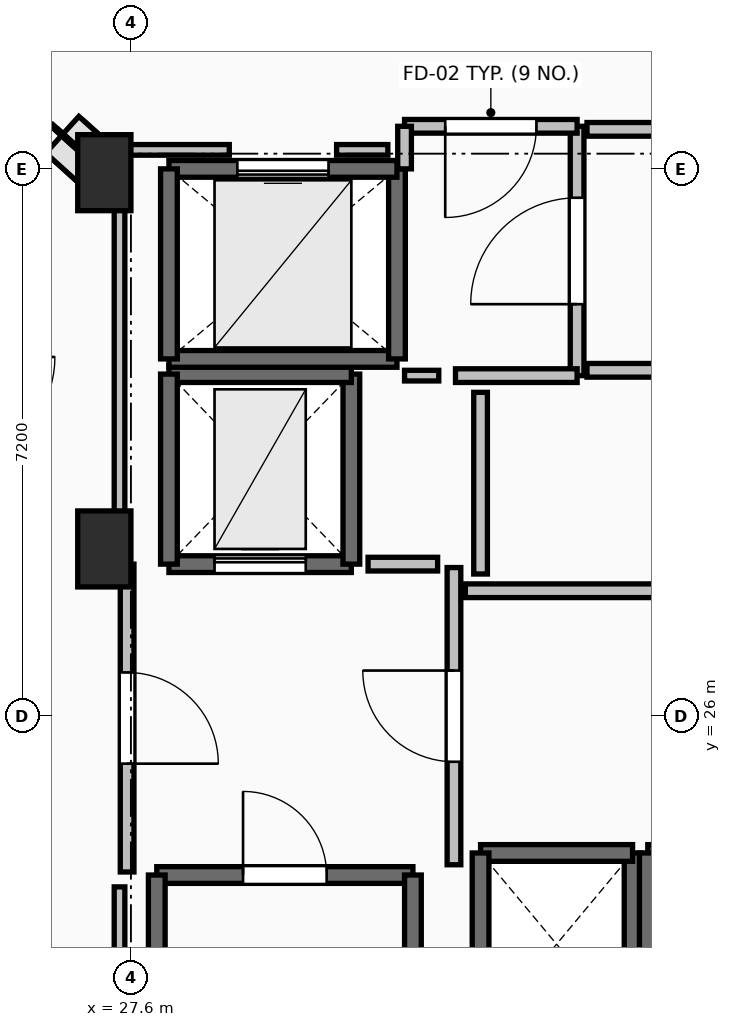
"""IFC4 building model, lengths in metres.
Left out: names, types, materials, properties, quantities, classifications, styles, units other than length and angle.
Written with IfcOpenShell. Run it as: python <this file> out.ifc"""

import sys

from ifc_helpers import new_model, si_unit, direction, frame, frame_2d, origin, origin_2d, place, context, subcontext, project, spatial, rectangle, extrude, element, fill, save


model = new_model("IFC4")
c1 = context("Model", 3, precision=1e-05, world=origin(), true_north=direction((0.0, 1.0)))
c2 = subcontext(c1, "Body", "Model", "MODEL_VIEW")
j1 = project(units=[si_unit("LENGTHUNIT", "METRE"), si_unit("PLANEANGLEUNIT", "RADIAN")], contexts=[c1])
p1 = place(None, origin())
s1 = spatial("IfcSite", under=j1, at=p1, CompositionType="ELEMENT")
p2 = place(p1, origin())
s2 = spatial("IfcBuilding", under=s1, at=p2, CompositionType="ELEMENT")
p3 = place(p2, frame((0.0, 0.0, 224.95)))
s3 = spatial("IfcBuildingStorey", under=s2, at=p3, CompositionType="ELEMENT", Elevation=224.95)
for number, where, z_axis, x_axis in (
    (1, (27.25, 28.2, 0.0), (0.0, 0.0, 1.0), (1.0, 0.0, 0.0)),
    (2, (27.25, 33.15, 0.0), (0.0, 0.0, 1.0), (1.0, 0.0, 0.0)),
):
    element("IfcColumn", number, at=place(p3, frame(where, z_axis=z_axis, x_axis=x_axis)), inside=s3, PredefinedType="PILASTER", context=c2, shape_type="SweptSolid", body=[
        extrude(rectangle(XDim=0.7, YDim=1.0, at=origin_2d()), origin(), (0.0, 0.0, 1.0), 4.8),
    ])
p4 = place(p3, frame((27.94, 23.91, 0.0), z_axis=(0.0, 0.0, 1.0), x_axis=(1.0, 0.0, 0.0)))
e3 = element("IfcWall", 3, at=p4, inside=s3, PredefinedType="SOLIDWALL", context=c2, shape_type="SweptSolid", body=[
    extrude(rectangle(XDim=3.37, YDim=0.22, at=frame_2d((1.685, 0.0))), origin(), (0.0, 0.0, 1.0), 4.5),
])
p5 = place(p4, frame((1.135, 0.0, 0.0)))
e4 = element("IfcOpeningElement", 4, at=p5, cuts=e3, PredefinedType="OPENING", context=c2, shape_type="SweptSolid", body=[
    extrude(rectangle(XDim=1.1, YDim=2.15, at=frame_2d((0.55, 1.075))), frame((0.0, 0.125, 0.0), z_axis=(0.0, -1.0, 0.0), x_axis=(1.0, 0.0, 0.0)), (0.0, 0.0, 1.0), 0.25),
])
for number, where, z_axis, x_axis in (
    (5, (31.31, 23.91, 0.0), (0.0, 0.0, 1.0), (0.0, -1.0, 0.0)),
    (6, (27.94, 16.49, 0.0), (0.0, 0.0, 1.0), (0.0, 1.0, 0.0)),
):
    element("IfcWall", number, at=place(p3, frame(where, z_axis=z_axis, x_axis=x_axis)), inside=s3, PredefinedType="SOLIDWALL", context=c2, shape_type="SweptSolid", body=[
        extrude(rectangle(XDim=7.42, YDim=0.22, at=frame_2d((3.71, 0.0))), origin(), (0.0, 0.0, 1.0), 4.5),
    ])
p6 = place(p3, frame((34.2, 21.8, 0.0), z_axis=(0.0, 0.0, 1.0), x_axis=(0.0, 1.0, 0.0)))
e7 = element("IfcWall", 7, at=p6, inside=s3, PredefinedType="SOLIDWALL", context=c2, shape_type="SweptSolid", body=[
    extrude(rectangle(XDim=2.4, YDim=0.22, at=frame_2d((1.2, 0.0))), origin(), (0.0, 0.0, 1.0), 4.5),
])
p7 = place(p3, frame((34.2, 24.2, 0.0), z_axis=(0.0, 0.0, 1.0), x_axis=(-1.0, 0.0, 0.0)))
e8 = element("IfcWall", 8, at=p7, inside=s3, PredefinedType="SOLIDWALL", context=c2, shape_type="SweptSolid", body=[
    extrude(rectangle(XDim=2.0, YDim=0.22, at=frame_2d((1.0, 0.0))), origin(), (0.0, 0.0, 1.0), 4.5),
])
p8 = place(p3, frame((32.2, 24.2, 0.0), z_axis=(0.0, 0.0, 1.0), x_axis=(0.0, -1.0, 0.0)))
e9 = element("IfcWall", 9, at=p8, inside=s3, PredefinedType="SOLIDWALL", context=c2, shape_type="SweptSolid", body=[
    extrude(rectangle(XDim=2.4, YDim=0.22, at=frame_2d((1.2, 0.0))), origin(), (0.0, 0.0, 1.0), 4.5),
])
p9 = place(p3, frame((36.4, 24.2, 0.0), z_axis=(0.0, 0.0, 1.0), x_axis=(-1.0, 0.0, 0.0)))
e10 = element("IfcWall", 10, at=p9, inside=s3, PredefinedType="SOLIDWALL", context=c2, shape_type="SweptSolid", body=[
    extrude(rectangle(XDim=2.0, YDim=0.22, at=frame_2d((1.0, 0.0))), origin(), (0.0, 0.0, 1.0), 4.5),
])
p10 = place(p3, frame((34.4, 24.2, 0.0), z_axis=(0.0, 0.0, 1.0), x_axis=(0.0, -1.0, 0.0)))
e11 = element("IfcWall", 11, at=p10, inside=s3, PredefinedType="SOLIDWALL", context=c2, shape_type="SweptSolid", body=[
    extrude(rectangle(XDim=2.4, YDim=0.22, at=frame_2d((1.2, 0.0))), origin(), (0.0, 0.0, 1.0), 4.5),
])
p11 = place(p3, frame((28.1, 28.0, 0.0), z_axis=(0.0, 0.0, 1.0), x_axis=(1.0, 0.0, 0.0)))
e12 = element("IfcWall", 12, at=p11, inside=s3, PredefinedType="SHEAR", context=c2, shape_type="SweptSolid", body=[
    extrude(rectangle(XDim=2.4, YDim=0.22, at=frame_2d((1.2, 0.0))), origin(), (0.0, 0.0, 1.0), 4.5),
])
p12 = place(p11, frame((0.6, 0.0, 0.0)))
e13 = element("IfcOpeningElement", 13, at=p12, cuts=e12, PredefinedType="OPENING", context=c2, shape_type="SweptSolid", body=[
    extrude(rectangle(XDim=1.2, YDim=2.2, at=frame_2d((0.6, 1.1))), frame((0.0, 0.125, 0.0), z_axis=(0.0, -1.0, 0.0), x_axis=(1.0, 0.0, 0.0)), (0.0, 0.0, 1.0), 0.25),
])
p13 = place(p3, frame((30.5, 28.0, 0.0), z_axis=(0.0, 0.0, 1.0), x_axis=(0.0, 1.0, 0.0)))
e14 = element("IfcWall", 14, at=p13, inside=s3, PredefinedType="SHEAR", context=c2, shape_type="SweptSolid", body=[
    extrude(rectangle(XDim=2.5, YDim=0.22, at=frame_2d((1.25, 0.0))), origin(), (0.0, 0.0, 1.0), 4.5),
])
p14 = place(p3, frame((30.5, 30.5, 0.0), z_axis=(0.0, 0.0, 1.0), x_axis=(-1.0, 0.0, 0.0)))
e15 = element("IfcWall", 15, at=p14, inside=s3, PredefinedType="SHEAR", context=c2, shape_type="SweptSolid", body=[
    extrude(rectangle(XDim=2.4, YDim=0.22, at=frame_2d((1.2, 0.0))), origin(), (0.0, 0.0, 1.0), 4.5),
])
p15 = place(p3, frame((28.1, 30.5, 0.0), z_axis=(0.0, 0.0, 1.0), x_axis=(0.0, -1.0, 0.0)))
e16 = element("IfcWall", 16, at=p15, inside=s3, PredefinedType="SHEAR", context=c2, shape_type="SweptSolid", body=[
    extrude(rectangle(XDim=2.5, YDim=0.22, at=frame_2d((1.25, 0.0))), origin(), (0.0, 0.0, 1.0), 4.5),
])
p16 = place(p3, frame((28.1, 30.7, 0.0), z_axis=(0.0, 0.0, 1.0), x_axis=(1.0, 0.0, 0.0)))
e17 = element("IfcWall", 17, at=p16, inside=s3, PredefinedType="SOLIDWALL", context=c2, shape_type="SweptSolid", body=[
    extrude(rectangle(XDim=3.0, YDim=0.22, at=frame_2d((1.5, 0.0))), origin(), (0.0, 0.0, 1.0), 4.5),
])
p17 = place(p3, frame((31.1, 30.7, 0.0), z_axis=(0.0, 0.0, 1.0), x_axis=(0.0, 1.0, 0.0)))
e18 = element("IfcWall", 18, at=p17, inside=s3, PredefinedType="SOLIDWALL", context=c2, shape_type="SweptSolid", body=[
    extrude(rectangle(XDim=2.5, YDim=0.22, at=frame_2d((1.25, 0.0))), origin(), (0.0, 0.0, 1.0), 4.5),
])
p18 = place(p3, frame((31.1, 33.2, 0.0), z_axis=(0.0, 0.0, 1.0), x_axis=(-1.0, 0.0, 0.0)))
e19 = element("IfcWall", 19, at=p18, inside=s3, PredefinedType="SOLIDWALL", context=c2, shape_type="SweptSolid", body=[
    extrude(rectangle(XDim=3.0, YDim=0.22, at=frame_2d((1.5, 0.0))), origin(), (0.0, 0.0, 1.0), 4.5),
])
p19 = place(p18, frame((0.9, 0.0, 0.0)))
e20 = element("IfcOpeningElement", 20, at=p19, cuts=e19, PredefinedType="OPENING", context=c2, shape_type="SweptSolid", body=[
    extrude(rectangle(XDim=1.2, YDim=2.2, at=frame_2d((0.6, 1.1))), frame((0.0, 0.125, 0.0), z_axis=(0.0, -1.0, 0.0), x_axis=(1.0, 0.0, 0.0)), (0.0, 0.0, 1.0), 0.25),
])
p20 = place(p3, frame((28.1, 33.2, 0.0), z_axis=(0.0, 0.0, 1.0), x_axis=(0.0, -1.0, 0.0)))
e21 = element("IfcWall", 21, at=p20, inside=s3, PredefinedType="SOLIDWALL", context=c2, shape_type="SweptSolid", body=[
    extrude(rectangle(XDim=2.5, YDim=0.22, at=frame_2d((1.25, 0.0))), origin(), (0.0, 0.0, 1.0), 4.5),
])
p21 = place(p3, frame((31.85, 24.045, 0.0), z_axis=(0.0, 0.0, 1.0), x_axis=(0.0, 1.0, 0.0)))
e22 = element("IfcWall", 22, at=p21, inside=s3, PredefinedType="PARTITIONING", context=c2, shape_type="SweptSolid", body=[
    extrude(rectangle(XDim=3.91, YDim=0.18, at=frame_2d((1.955, 0.0))), origin(), (0.0, 0.0, 1.0), 4.5),
])
p22 = place(p21, frame((1.355, 0.0, 0.0)))
e23 = element("IfcOpeningElement", 23, at=p22, cuts=e22, PredefinedType="OPENING", context=c2, shape_type="SweptSolid", body=[
    extrude(rectangle(XDim=1.2, YDim=2.15, at=frame_2d((0.6, 1.075))), frame((0.0, 0.105, 0.0), z_axis=(0.0, -1.0, 0.0), x_axis=(1.0, 0.0, 0.0)), (0.0, 0.0, 1.0), 0.21),
])
p23 = place(p3, frame((27.55, 28.0, 0.0), z_axis=(0.0, 0.0, 1.0), x_axis=(0.0, -1.0, 0.0)))
e24 = element("IfcWall", 24, at=p23, inside=s3, PredefinedType="PARTITIONING", context=c2, shape_type="SweptSolid", body=[
    extrude(rectangle(XDim=4.05, YDim=0.18, at=frame_2d((2.025, 0.0))), origin(), (0.0, 0.0, 1.0), 3.482),
])
p24 = place(p23, frame((1.425, 0.0, 0.0)))
e25 = element("IfcOpeningElement", 25, at=p24, cuts=e24, PredefinedType="OPENING", context=c2, shape_type="SweptSolid", body=[
    extrude(rectangle(XDim=1.2, YDim=2.15, at=frame_2d((0.6, 1.075))), frame((0.0, 0.105, 0.0), z_axis=(0.0, -1.0, 0.0), x_axis=(1.0, 0.0, 0.0)), (0.0, 0.0, 1.0), 0.21),
])
p25 = place(p3, frame((33.47, 30.48, 0.0), z_axis=(0.0, 0.0, 1.0), x_axis=(0.0, 1.0, 0.0)))
e26 = element("IfcWall", 26, at=p25, inside=s3, PredefinedType="PARTITIONING", context=c2, shape_type="SweptSolid", body=[
    extrude(rectangle(XDim=3.28, YDim=0.18, at=frame_2d((1.64, 0.0))), origin(), (0.0, 0.0, 1.0), 4.5),
])
p26 = place(p25, frame((0.94, 0.0, 0.0)))
e27 = element("IfcOpeningElement", 27, at=p26, cuts=e26, PredefinedType="OPENING", context=c2, shape_type="SweptSolid", body=[
    extrude(rectangle(XDim=1.4, YDim=2.2, at=frame_2d((0.7, 1.1))), frame((0.0, 0.105, 0.0), z_axis=(0.0, -1.0, 0.0), x_axis=(1.0, 0.0, 0.0)), (0.0, 0.0, 1.0), 0.21),
])
p27 = place(p3, frame((31.87, 30.48, 0.0), z_axis=(0.0, 0.0, 1.0), x_axis=(1.0, 0.0, 0.0)))
e28 = element("IfcWall", 28, at=p27, inside=s3, PredefinedType="PARTITIONING", context=c2, shape_type="SweptSolid", body=[
    extrude(rectangle(XDim=1.6, YDim=0.18, at=frame_2d((0.8, 0.0))), origin(), (0.0, 0.0, 1.0), 4.5),
])
p28 = place(p3, frame((33.47, 33.76, 0.0), z_axis=(0.0, 0.0, 1.0), x_axis=(-1.0, 0.0, 0.0)))
e29 = element("IfcWall", 29, at=p28, inside=s3, PredefinedType="PARTITIONING", context=c2, shape_type="SweptSolid", body=[
    extrude(rectangle(XDim=2.27, YDim=0.18, at=frame_2d((1.135, 0.0))), origin(), (0.0, 0.0, 1.0), 4.5),
])
p29 = place(p28, frame((0.535, 0.0, 0.0)))
e30 = element("IfcOpeningElement", 30, at=p29, cuts=e29, PredefinedType="OPENING", context=c2, shape_type="SweptSolid", body=[
    extrude(rectangle(XDim=1.2, YDim=2.15, at=frame_2d((0.6, 1.075))), frame((0.0, 0.105, 0.0), z_axis=(0.0, -1.0, 0.0), x_axis=(1.0, 0.0, 0.0)), (0.0, 0.0, 1.0), 0.21),
])
p30 = place(p3, frame((31.2, 33.76, 0.0), z_axis=(0.0, 0.0, 1.0), x_axis=(0.0, -1.0, 0.0)))
e31 = element("IfcWall", 31, at=p30, inside=s3, PredefinedType="PARTITIONING", context=c2, shape_type="SweptSolid", body=[
    extrude(rectangle(XDim=0.56, YDim=0.18, at=frame_2d((0.28, 0.0))), origin(), (0.0, 0.0, 1.0), 4.5),
])
p31 = place(p3, frame((39.19, 27.65, 0.0), z_axis=(0.0, 0.0, 1.0), x_axis=(-1.0, 0.0, 0.0)))
e32 = element("IfcWall", 32, at=p31, inside=s3, PredefinedType="PARTITIONING", context=c2, shape_type="SweptSolid", body=[
    extrude(rectangle(XDim=7.19, YDim=0.18, at=frame_2d((3.595, 0.0))), origin(), (0.0, 0.0, 1.0), 4.5),
])
p32 = place(p31, frame((2.895, 0.0, 0.0)))
e33 = element("IfcOpeningElement", 33, at=p32, cuts=e32, PredefinedType="OPENING", context=c2, shape_type="SweptSolid", body=[
    extrude(rectangle(XDim=1.4, YDim=2.2, at=frame_2d((0.7, 1.1))), frame((0.0, 0.105, 0.0), z_axis=(0.0, -1.0, 0.0), x_axis=(1.0, 0.0, 0.0)), (0.0, 0.0, 1.0), 0.21),
])
p33 = place(p3, frame((33.6, 30.55, 0.0), z_axis=(0.0, 0.0, 1.0), x_axis=(1.0, 0.0, 0.0)))
e34 = element("IfcWall", 34, at=p33, inside=s3, PredefinedType="PARTITIONING", context=c2, shape_type="SweptSolid", body=[
    extrude(rectangle(XDim=5.2, YDim=0.18, at=frame_2d((2.6, 0.0))), origin(), (0.0, 0.0, 1.0), 3.482),
])
p34 = place(p3, frame((38.8, 33.72, 0.0), z_axis=(0.0, 0.0, 1.0), x_axis=(-1.0, 0.0, 0.0)))
e35 = element("IfcWall", 35, at=p34, inside=s3, PredefinedType="PARTITIONING", context=c2, shape_type="SweptSolid", body=[
    extrude(rectangle(XDim=5.2, YDim=0.18, at=frame_2d((2.6, 0.0))), origin(), (0.0, 0.0, 1.0), 4.5),
])
p35 = place(p34, frame((1.9, 0.0, 0.0)))
e36 = element("IfcOpeningElement", 36, at=p35, cuts=e35, PredefinedType="OPENING", context=c2, shape_type="SweptSolid", body=[
    extrude(rectangle(XDim=1.4, YDim=2.2, at=frame_2d((0.7, 1.1))), frame((0.0, 0.105, 0.0), z_axis=(0.0, -1.0, 0.0), x_axis=(1.0, 0.0, 0.0)), (0.0, 0.0, 1.0), 0.21),
])
p36 = place(p3, frame((31.635, 28.0, 0.0), z_axis=(0.0, 0.0, 1.0), x_axis=(-1.0, 0.0, 0.0)))
e37 = element("IfcWall", 37, at=p36, inside=s3, PredefinedType="PARTITIONING", context=c2, shape_type="SweptSolid", body=[
    extrude(rectangle(XDim=0.915, YDim=0.18, at=frame_2d((0.458, 0.0))), origin(), (0.0, 0.0, 1.0), 4.5),
])
p37 = place(p3, frame((31.2, 30.48, 0.0), z_axis=(0.0, 0.0, 1.0), x_axis=(1.0, 0.0, 0.0)))
e38 = element("IfcWall", 38, at=p37, inside=s3, PredefinedType="PARTITIONING", context=c2, shape_type="SweptSolid", body=[
    extrude(rectangle(XDim=0.45, YDim=0.14, at=frame_2d((0.225, 0.0))), origin(), (0.0, 0.0, 1.0), 4.5),
])
p38 = place(p3, frame((32.2, 30.26, 0.0), z_axis=(0.0, 0.0, 1.0), x_axis=(0.0, -1.0, 0.0)))
e39 = element("IfcWall", 39, at=p38, inside=s3, PredefinedType="PARTITIONING", context=c2, shape_type="SweptSolid", body=[
    extrude(rectangle(XDim=2.39, YDim=0.18, at=frame_2d((1.195, 0.0))), origin(), (0.0, 0.0, 1.0), 4.5),
])
p39 = place(p3, frame((30.98, 33.45, 0.0), z_axis=(0.0, 0.0, 1.0), x_axis=(-1.0, 0.0, 0.0)))
e40 = element("IfcWall", 40, at=p39, inside=s3, PredefinedType="PARTITIONING", context=c2, shape_type="SweptSolid", body=[
    extrude(rectangle(XDim=0.674, YDim=0.14, at=frame_2d((0.337, 0.0))), origin(), (0.0, 0.0, 1.0), 4.5),
])
p40 = place(p3, frame((28.894, 33.45, 0.0), z_axis=(0.0, 0.0, 1.0), x_axis=(-1.0, 0.0, 0.0)))
e41 = element("IfcWall", 41, at=p40, inside=s3, PredefinedType="PARTITIONING", context=c2, shape_type="SweptSolid", body=[
    extrude(rectangle(XDim=1.444, YDim=0.14, at=frame_2d((0.722, 0.0))), origin(), (0.0, 0.0, 1.0), 3.482),
])
p41 = place(p3, frame((27.45, 33.45, 0.0), z_axis=(0.0, 0.0, 1.0), x_axis=(0.0, -1.0, 0.0)))
e42 = element("IfcWall", 42, at=p41, inside=s3, PredefinedType="PARTITIONING", context=c2, shape_type="SweptSolid", body=[
    extrude(rectangle(XDim=5.254, YDim=0.14, at=frame_2d((2.627, 0.0))), origin(), (0.0, 0.0, 1.0), 3.482),
])
p42 = place(p3, frame((27.45, 23.754, 0.0), z_axis=(0.0, 0.0, 1.0), x_axis=(0.0, -1.0, 0.0)))
e43 = element("IfcWall", 43, at=p42, inside=s3, PredefinedType="PARTITIONING", context=c2, shape_type="SweptSolid", body=[
    extrude(rectangle(XDim=7.514, YDim=0.14, at=frame_2d((3.757, 0.0))), origin(), (0.0, 0.0, 1.0), 3.482),
])
p43 = place(p5, origin())
e44 = element("IfcDoor", 44, at=p43, inside=s3, OperationType="SINGLE_SWING_LEFT", PredefinedType="DOOR", context=c2, shape_type="SweptSolid", body=[
    extrude(rectangle(XDim=1.1, YDim=2.15, at=frame_2d((0.55, 1.075))), frame((0.0, 0.025, 0.0), z_axis=(0.0, -1.0, 0.0), x_axis=(1.0, 0.0, 0.0)), (0.0, 0.0, 1.0), 0.05),
])
fill(e4, e44)
p44 = place(p12, origin())
e45 = element("IfcDoor", 45, at=p44, inside=s3, OperationType="SLIDING_TO_LEFT", PredefinedType="DOOR", context=c2, shape_type="SweptSolid", body=[
    extrude(rectangle(XDim=1.2, YDim=2.2, at=frame_2d((0.6, 1.1))), frame((0.0, 0.025, 0.0), z_axis=(0.0, -1.0, 0.0), x_axis=(1.0, 0.0, 0.0)), (0.0, 0.0, 1.0), 0.05),
])
fill(e13, e45)
p45 = place(p19, origin())
e46 = element("IfcDoor", 46, at=p45, inside=s3, OperationType="SLIDING_TO_LEFT", PredefinedType="DOOR", context=c2, shape_type="SweptSolid", body=[
    extrude(rectangle(XDim=1.2, YDim=2.2, at=frame_2d((0.6, 1.1))), frame((0.0, 0.025, 0.0), z_axis=(0.0, -1.0, 0.0), x_axis=(1.0, 0.0, 0.0)), (0.0, 0.0, 1.0), 0.05),
])
fill(e20, e46)
p46 = place(p22, origin())
e47 = element("IfcDoor", 47, at=p46, inside=s3, OperationType="SINGLE_SWING_RIGHT", PredefinedType="DOOR", context=c2, shape_type="SweptSolid", body=[
    extrude(rectangle(XDim=1.2, YDim=2.15, at=frame_2d((0.6, 1.075))), frame((0.0, 0.025, 0.0), z_axis=(0.0, -1.0, 0.0), x_axis=(1.0, 0.0, 0.0)), (0.0, 0.0, 1.0), 0.05),
])
fill(e23, e47)
p47 = place(p24, origin())
e48 = element("IfcDoor", 48, at=p47, inside=s3, OperationType="SINGLE_SWING_RIGHT", PredefinedType="DOOR", context=c2, shape_type="SweptSolid", body=[
    extrude(rectangle(XDim=1.2, YDim=2.15, at=frame_2d((0.6, 1.075))), frame((0.0, 0.025, 0.0), z_axis=(0.0, -1.0, 0.0), x_axis=(1.0, 0.0, 0.0)), (0.0, 0.0, 1.0), 0.05),
])
fill(e25, e48)
p48 = place(p26, origin())
e49 = element("IfcDoor", 49, at=p48, inside=s3, OperationType="DOUBLE_SWING_LEFT", PredefinedType="DOOR", context=c2, shape_type="SweptSolid", body=[
    extrude(rectangle(XDim=1.4, YDim=2.2, at=frame_2d((0.7, 1.1))), frame((0.0, 0.025, 0.0), z_axis=(0.0, -1.0, 0.0), x_axis=(1.0, 0.0, 0.0)), (0.0, 0.0, 1.0), 0.05),
])
fill(e27, e49)
p49 = place(p29, origin())
e50 = element("IfcDoor", 50, at=p49, inside=s3, OperationType="SINGLE_SWING_RIGHT", PredefinedType="DOOR", context=c2, shape_type="SweptSolid", body=[
    extrude(rectangle(XDim=1.2, YDim=2.15, at=frame_2d((0.6, 1.075))), frame((0.0, 0.025, 0.0), z_axis=(0.0, -1.0, 0.0), x_axis=(1.0, 0.0, 0.0)), (0.0, 0.0, 1.0), 0.05),
])
fill(e30, e50)
save(model, sys.argv[1])
